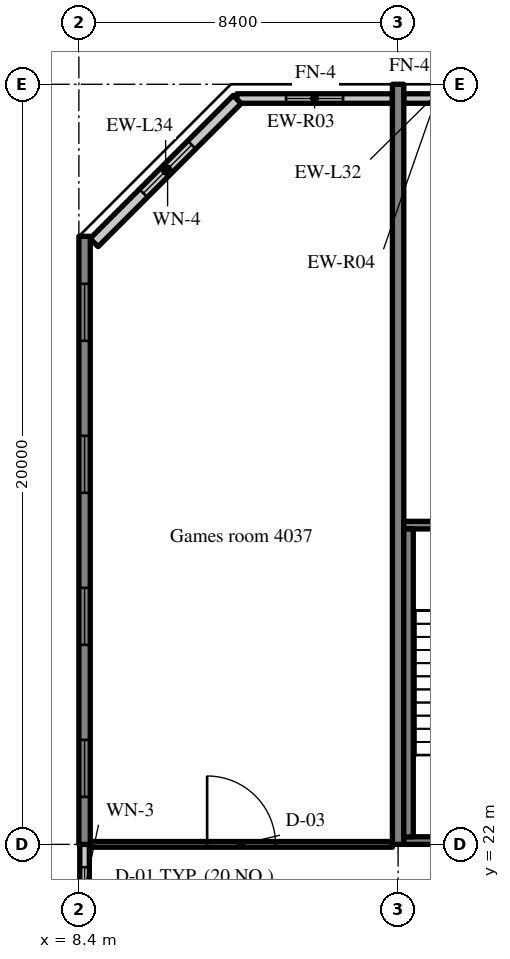
"""IFC4 building model, lengths in metres.
Left out: names, types, materials, properties, quantities, classifications, styles, units other than length and angle.
Written with IfcOpenShell. Run it as: python <this file> out.ifc"""

import sys

from ifc_helpers import new_model, si_unit, direction, frame, frame_2d, origin, place, context, subcontext, project, spatial, rectangle, extrude, source, transform, mapped, element, fill, save


model = new_model("IFC4")
c1 = context("Model", 3, precision=1e-05, world=origin(), true_north=direction((0.0, 1.0)))
c2 = subcontext(c1, "Body", "Model", "MODEL_VIEW")
j1 = project(units=[si_unit("LENGTHUNIT", "METRE"), si_unit("PLANEANGLEUNIT", "RADIAN")], contexts=[c1])
p1 = place(None, origin())
s1 = spatial("IfcSite", under=j1, at=p1, CompositionType="ELEMENT")
p2 = place(p1, origin())
s2 = spatial("IfcBuilding", under=s1, at=p2, CompositionType="ELEMENT")
p3 = place(p2, frame((0.0, 0.0, 166.8)))
s3 = spatial("IfcBuildingStorey", under=s2, at=p3, CompositionType="ELEMENT", Elevation=166.8)
m1 = source(origin(), c2, "Body", "SweptSolid", [
    extrude(rectangle(XDim=16.0, YDim=0.3, at=frame_2d((8.0, 0.0))), origin(), (0.0, 0.0, 1.0), 3.52),
])
p4 = place(p3, frame((8.55, 22.0, 0.0), z_axis=(0.0, 0.0, 1.0), x_axis=(0.0, 1.0, 0.0)))
e1 = element("IfcWall", 1, at=p4, inside=s3, PredefinedType="SHEAR", context=c2, shape_type="MappedRepresentation", body=[
    mapped(m1, transform((0.0, 0.0, 0.0), scale=1.0)),
])
m2 = source(origin(), c2, "Body", "SweptSolid", [
    extrude(rectangle(XDim=1.5, YDim=1.5, at=frame_2d((0.75, 0.75))), frame((0.0, 0.16, 0.0), z_axis=(0.0, -1.0, 0.0), x_axis=(1.0, 0.0, 0.0)), (0.0, 0.0, 1.0), 0.32),
])
p5 = place(p4, frame((1.25, 0.0, 0.9)))
e2 = element("IfcOpeningElement", 2, at=p5, cuts=e1, PredefinedType="OPENING", context=c2, shape_type="MappedRepresentation", body=[
    mapped(m2, transform((0.0, 0.0, 0.0), scale=1.0)),
])
p6 = place(p4, frame((5.25, 0.0, 0.9)))
e3 = element("IfcOpeningElement", 3, at=p6, cuts=e1, PredefinedType="OPENING", context=c2, shape_type="MappedRepresentation", body=[
    mapped(m2, transform((0.0, 0.0, 0.0), scale=1.0)),
])
p7 = place(p4, frame((9.25, 0.0, 0.9)))
e4 = element("IfcOpeningElement", 4, at=p7, cuts=e1, PredefinedType="OPENING", context=c2, shape_type="MappedRepresentation", body=[
    mapped(m2, transform((0.0, 0.0, 0.0), scale=1.0)),
])
p8 = place(p4, frame((13.25, 0.0, 0.9)))
e5 = element("IfcOpeningElement", 5, at=p8, cuts=e1, PredefinedType="OPENING", context=c2, shape_type="MappedRepresentation", body=[
    mapped(m2, transform((0.0, 0.0, 0.0), scale=1.0)),
])
m3 = source(origin(), c2, "Body", "SweptSolid", [
    extrude(rectangle(XDim=20.0, YDim=0.3, at=frame_2d((10.0, 0.0))), origin(), (0.0, 0.0, 1.0), 3.52),
])
p9 = place(p3, frame((16.8, 22.0, 0.0), z_axis=(0.0, 0.0, 1.0), x_axis=(0.0, 1.0, 0.0)))
e6 = element("IfcWall", 6, at=p9, inside=s3, PredefinedType="SHEAR", context=c2, shape_type="MappedRepresentation", body=[
    mapped(m3, transform((0.0, 0.0, 0.0), scale=1.0)),
])
m4 = source(origin(), c2, "Body", "SweptSolid", [
    extrude(rectangle(XDim=4.094, YDim=0.25, at=frame_2d((2.047, 0.0))), origin(), (0.0, 0.0, 1.0), 2.87),
])
p10 = place(p3, frame((16.65, 41.625, 0.0), z_axis=(0.0, 0.0, 1.0), x_axis=(-1.0, 0.0, 0.0)))
e7 = element("IfcWall", 7, at=p10, inside=s3, PredefinedType="SOLIDWALL", context=c2, shape_type="MappedRepresentation", body=[
    mapped(m4, transform((0.0, 0.0, 0.0), scale=1.0)),
])
m5 = source(origin(), c2, "Body", "SweptSolid", [
    extrude(rectangle(XDim=1.5, YDim=1.5, at=frame_2d((0.75, 0.75))), frame((0.0, 0.135, 0.0), z_axis=(0.0, -1.0, 0.0), x_axis=(1.0, 0.0, 0.0)), (0.0, 0.0, 1.0), 0.27),
])
p11 = place(p10, frame((1.297, 0.0, 0.9)))
e8 = element("IfcOpeningElement", 8, at=p11, cuts=e7, PredefinedType="OPENING", context=c2, shape_type="MappedRepresentation", body=[
    mapped(m5, transform((0.0, 0.0, 0.0), scale=1.0)),
])
m6 = source(origin(), c2, "Body", "SweptSolid", [
    extrude(rectangle(XDim=1.708, YDim=0.25, at=frame_2d((0.854, 0.0))), origin(), (0.0, 0.0, 1.0), 2.87),
])
p12 = place(p3, frame((18.658, 41.625, 0.0), z_axis=(0.0, 0.0, 1.0), x_axis=(-1.0, 0.0, 0.0)))
e9 = element("IfcWall", 9, at=p12, inside=s3, PredefinedType="SOLIDWALL", context=c2, shape_type="MappedRepresentation", body=[
    mapped(m6, transform((0.0, 0.0, 0.0), scale=1.0)),
])
m7 = source(origin(), c2, "Body", "SweptSolid", [
    extrude(rectangle(XDim=5.326, YDim=0.3, at=frame_2d((2.663, 0.0))), origin(), (0.0, 0.0, 1.0), 3.52),
])
p13 = place(p3, frame((12.566, 41.6, 0.0), z_axis=(0.0, 0.0, 1.0), x_axis=(-0.707083859269, -0.707129702361, 0.0)))
e10 = element("IfcWall", 10, at=p13, inside=s3, PredefinedType="SOLIDWALL", context=c2, shape_type="MappedRepresentation", body=[
    mapped(m7, transform((0.0, 0.0, 0.0), scale=1.0)),
])
m8 = source(origin(), c2, "Body", "SweptSolid", [
    extrude(rectangle(XDim=1.8, YDim=1.5, at=frame_2d((0.9, 0.75))), frame((0.0, 0.16, 0.0), z_axis=(0.0, -1.0, 0.0), x_axis=(1.0, 0.0, 0.0)), (0.0, 0.0, 1.0), 0.32),
])
p14 = place(p13, frame((1.689, 0.0, 0.9)))
e11 = element("IfcOpeningElement", 11, at=p14, cuts=e10, PredefinedType="OPENING", context=c2, shape_type="MappedRepresentation", body=[
    mapped(m8, transform((0.0, 0.0, 0.0), scale=1.0)),
])
m9 = source(origin(), c2, "Body", "SweptSolid", [
    extrude(rectangle(XDim=2.4, YDim=0.25, at=frame_2d((1.2, 0.0))), origin(), (0.0, 0.0, 1.0), 2.62),
])
p15 = place(p3, frame((8.55, 19.6, 0.0), z_axis=(0.0, 0.0, 1.0), x_axis=(0.0, 1.0, 0.0)))
e12 = element("IfcWall", 12, at=p15, inside=s3, PredefinedType="SOLIDWALL", context=c2, shape_type="MappedRepresentation", body=[
    mapped(m9, transform((0.0, 0.0, 0.0), scale=1.0)),
])
m10 = source(origin(), c2, "Body", "SweptSolid", [
    extrude(rectangle(XDim=1.2, YDim=1.5, at=frame_2d((0.6, 0.75))), frame((0.0, 0.135, 0.0), z_axis=(0.0, -1.0, 0.0), x_axis=(1.0, 0.0, 0.0)), (0.0, 0.0, 1.0), 0.27),
])
p16 = place(p15, frame((0.6, 0.0, 0.9)))
e13 = element("IfcOpeningElement", 13, at=p16, cuts=e12, PredefinedType="OPENING", context=c2, shape_type="MappedRepresentation", body=[
    mapped(m10, transform((0.0, 0.0, 0.0), scale=1.0)),
])
m11 = source(origin(), c2, "Body", "SweptSolid", [
    extrude(rectangle(XDim=8.25, YDim=0.2, at=frame_2d((4.125, 0.0))), origin(), (0.0, 0.0, 1.0), 3.52),
])
p17 = place(p3, frame((16.95, 22.1, 0.0), z_axis=(0.0, 0.0, 1.0), x_axis=(1.0, 0.0, 0.0)))
e14 = element("IfcWall", 14, at=p17, inside=s3, PredefinedType="SOLIDWALL", context=c2, shape_type="MappedRepresentation", body=[
    mapped(m11, transform((0.0, 0.0, 0.0), scale=1.0)),
])
m12 = source(origin(), c2, "Body", "SweptSolid", [
    extrude(rectangle(XDim=1.2, YDim=2.1, at=frame_2d((0.6, 1.05))), frame((0.0, 0.11, 0.0), z_axis=(0.0, -1.0, 0.0), x_axis=(1.0, 0.0, 0.0)), (0.0, 0.0, 1.0), 0.22),
])
p18 = place(p17, frame((6.05, 0.0, 0.0)))
e15 = element("IfcOpeningElement", 15, at=p18, cuts=e14, PredefinedType="OPENING", context=c2, shape_type="MappedRepresentation", body=[
    mapped(m12, transform((0.0, 0.0, 0.0), scale=1.0)),
])
p19 = place(p3, frame((16.95, 30.4, 0.0), z_axis=(0.0, 0.0, 1.0), x_axis=(1.0, 0.0, 0.0)))
e16 = element("IfcWall", 16, at=p19, inside=s3, PredefinedType="SOLIDWALL", context=c2, shape_type="MappedRepresentation", body=[
    mapped(m11, transform((0.0, 0.0, 0.0), scale=1.0)),
])
m13 = source(origin(), c2, "Body", "SweptSolid", [
    extrude(rectangle(XDim=1.0, YDim=2.1, at=frame_2d((0.5, 1.05))), frame((0.0, 0.11, 0.0), z_axis=(0.0, -1.0, 0.0), x_axis=(1.0, 0.0, 0.0)), (0.0, 0.0, 1.0), 0.22),
])
p20 = place(p19, frame((6.15, 0.0, 0.0)))
e17 = element("IfcOpeningElement", 17, at=p20, cuts=e16, PredefinedType="OPENING", context=c2, shape_type="MappedRepresentation", body=[
    mapped(m13, transform((0.0, 0.0, 0.0), scale=1.0)),
])
m14 = source(origin(), c2, "Body", "SweptSolid", [
    extrude(rectangle(XDim=8.1, YDim=0.25, at=frame_2d((4.05, 0.0))), origin(), (0.0, 0.0, 1.0), 3.52),
])
p21 = place(p3, frame((17.075, 22.2, 0.0), z_axis=(0.0, 0.0, 1.0), x_axis=(0.0, 1.0, 0.0)))
e18 = element("IfcWall", 18, at=p21, inside=s3, PredefinedType="SOLIDWALL", context=c2, shape_type="MappedRepresentation", body=[
    mapped(m14, transform((0.0, 0.0, 0.0), scale=1.0)),
])
m15 = source(origin(), c2, "Body", "SweptSolid", [
    extrude(rectangle(XDim=7.95, YDim=0.15, at=frame_2d((3.975, 0.0))), origin(), (0.0, 0.0, 1.0), 2.82),
])
p22 = place(p3, frame((8.7, 22.0, 0.0), z_axis=(0.0, 0.0, 1.0), x_axis=(1.0, 0.0, 0.0)))
e19 = element("IfcWall", 19, at=p22, inside=s3, PredefinedType="PARTITIONING", context=c2, shape_type="MappedRepresentation", body=[
    mapped(m15, transform((0.0, 0.0, 0.0), scale=1.0)),
])
m16 = source(origin(), c2, "Body", "SweptSolid", [
    extrude(rectangle(XDim=1.8, YDim=2.1, at=frame_2d((0.9, 1.05))), frame((0.0, 0.085, 0.0), z_axis=(0.0, -1.0, 0.0), x_axis=(1.0, 0.0, 0.0)), (0.0, 0.0, 1.0), 0.17),
])
p23 = place(p22, frame((3.075, 0.0, 0.0)))
e20 = element("IfcOpeningElement", 20, at=p23, cuts=e19, PredefinedType="OPENING", context=c2, shape_type="MappedRepresentation", body=[
    mapped(m16, transform((0.0, 0.0, 0.0), scale=1.0)),
])
m17 = source(origin(), c2, "Body", "SweptSolid", [
    extrude(rectangle(XDim=1.5, YDim=1.5, at=frame_2d((0.75, 0.75))), frame((0.0, 0.03, 0.0), z_axis=(0.0, -1.0, 0.0), x_axis=(1.0, 0.0, 0.0)), (0.0, 0.0, 1.0), 0.06),
])
p24 = place(p11, origin())
e21 = element("IfcWindow", 21, at=p24, inside=s3, PartitioningType="SINGLE_PANEL", PredefinedType="WINDOW", context=c2, shape_type="MappedRepresentation", body=[
    mapped(m17, transform((0.0, 0.0, 0.0), scale=1.0)),
])
fill(e8, e21)
m18 = source(origin(), c2, "Body", "SweptSolid", [
    extrude(rectangle(XDim=1.8, YDim=1.5, at=frame_2d((0.9, 0.75))), frame((0.0, 0.03, 0.0), z_axis=(0.0, -1.0, 0.0), x_axis=(1.0, 0.0, 0.0)), (0.0, 0.0, 1.0), 0.06),
])
p25 = place(p14, origin())
e22 = element("IfcWindow", 22, at=p25, inside=s3, PartitioningType="SINGLE_PANEL", PredefinedType="WINDOW", context=c2, shape_type="MappedRepresentation", body=[
    mapped(m18, transform((0.0, 0.0, 0.0), scale=1.0)),
])
fill(e11, e22)
p26 = place(p5, origin())
e23 = element("IfcWindow", 23, at=p26, inside=s3, PartitioningType="SINGLE_PANEL", PredefinedType="WINDOW", context=c2, shape_type="MappedRepresentation", body=[
    mapped(m17, transform((0.0, 0.0, 0.0), scale=1.0)),
])
fill(e2, e23)
p27 = place(p6, origin())
e24 = element("IfcWindow", 24, at=p27, inside=s3, PartitioningType="SINGLE_PANEL", PredefinedType="WINDOW", context=c2, shape_type="MappedRepresentation", body=[
    mapped(m17, transform((0.0, 0.0, 0.0), scale=1.0)),
])
fill(e3, e24)
p28 = place(p7, origin())
e25 = element("IfcWindow", 25, at=p28, inside=s3, PartitioningType="SINGLE_PANEL", PredefinedType="WINDOW", context=c2, shape_type="MappedRepresentation", body=[
    mapped(m17, transform((0.0, 0.0, 0.0), scale=1.0)),
])
fill(e4, e25)
p29 = place(p8, origin())
e26 = element("IfcWindow", 26, at=p29, inside=s3, PartitioningType="SINGLE_PANEL", PredefinedType="WINDOW", context=c2, shape_type="MappedRepresentation", body=[
    mapped(m17, transform((0.0, 0.0, 0.0), scale=1.0)),
])
fill(e5, e26)
m19 = source(origin(), c2, "Body", "SweptSolid", [
    extrude(rectangle(XDim=1.2, YDim=1.5, at=frame_2d((0.6, 0.75))), frame((0.0, 0.03, 0.0), z_axis=(0.0, -1.0, 0.0), x_axis=(1.0, 0.0, 0.0)), (0.0, 0.0, 1.0), 0.06),
])
p30 = place(p16, origin())
e27 = element("IfcWindow", 27, at=p30, inside=s3, PartitioningType="SINGLE_PANEL", PredefinedType="WINDOW", context=c2, shape_type="MappedRepresentation", body=[
    mapped(m19, transform((0.0, 0.0, 0.0), scale=1.0)),
])
fill(e13, e27)
m20 = source(origin(), c2, "Body", "SweptSolid", [
    extrude(rectangle(XDim=1.8, YDim=2.1, at=frame_2d((0.9, 1.05))), frame((0.0, 0.025, 0.0), z_axis=(0.0, -1.0, 0.0), x_axis=(1.0, 0.0, 0.0)), (0.0, 0.0, 1.0), 0.05),
])
p31 = place(p23, origin())
e28 = element("IfcDoor", 28, at=p31, inside=s3, OperationType="DOUBLE_DOOR_SINGLE_SWING", PredefinedType="DOOR", context=c2, shape_type="MappedRepresentation", body=[
    mapped(m20, transform((0.0, 0.0, 0.0), scale=1.0)),
])
fill(e20, e28)
save(model, sys.argv[1])
